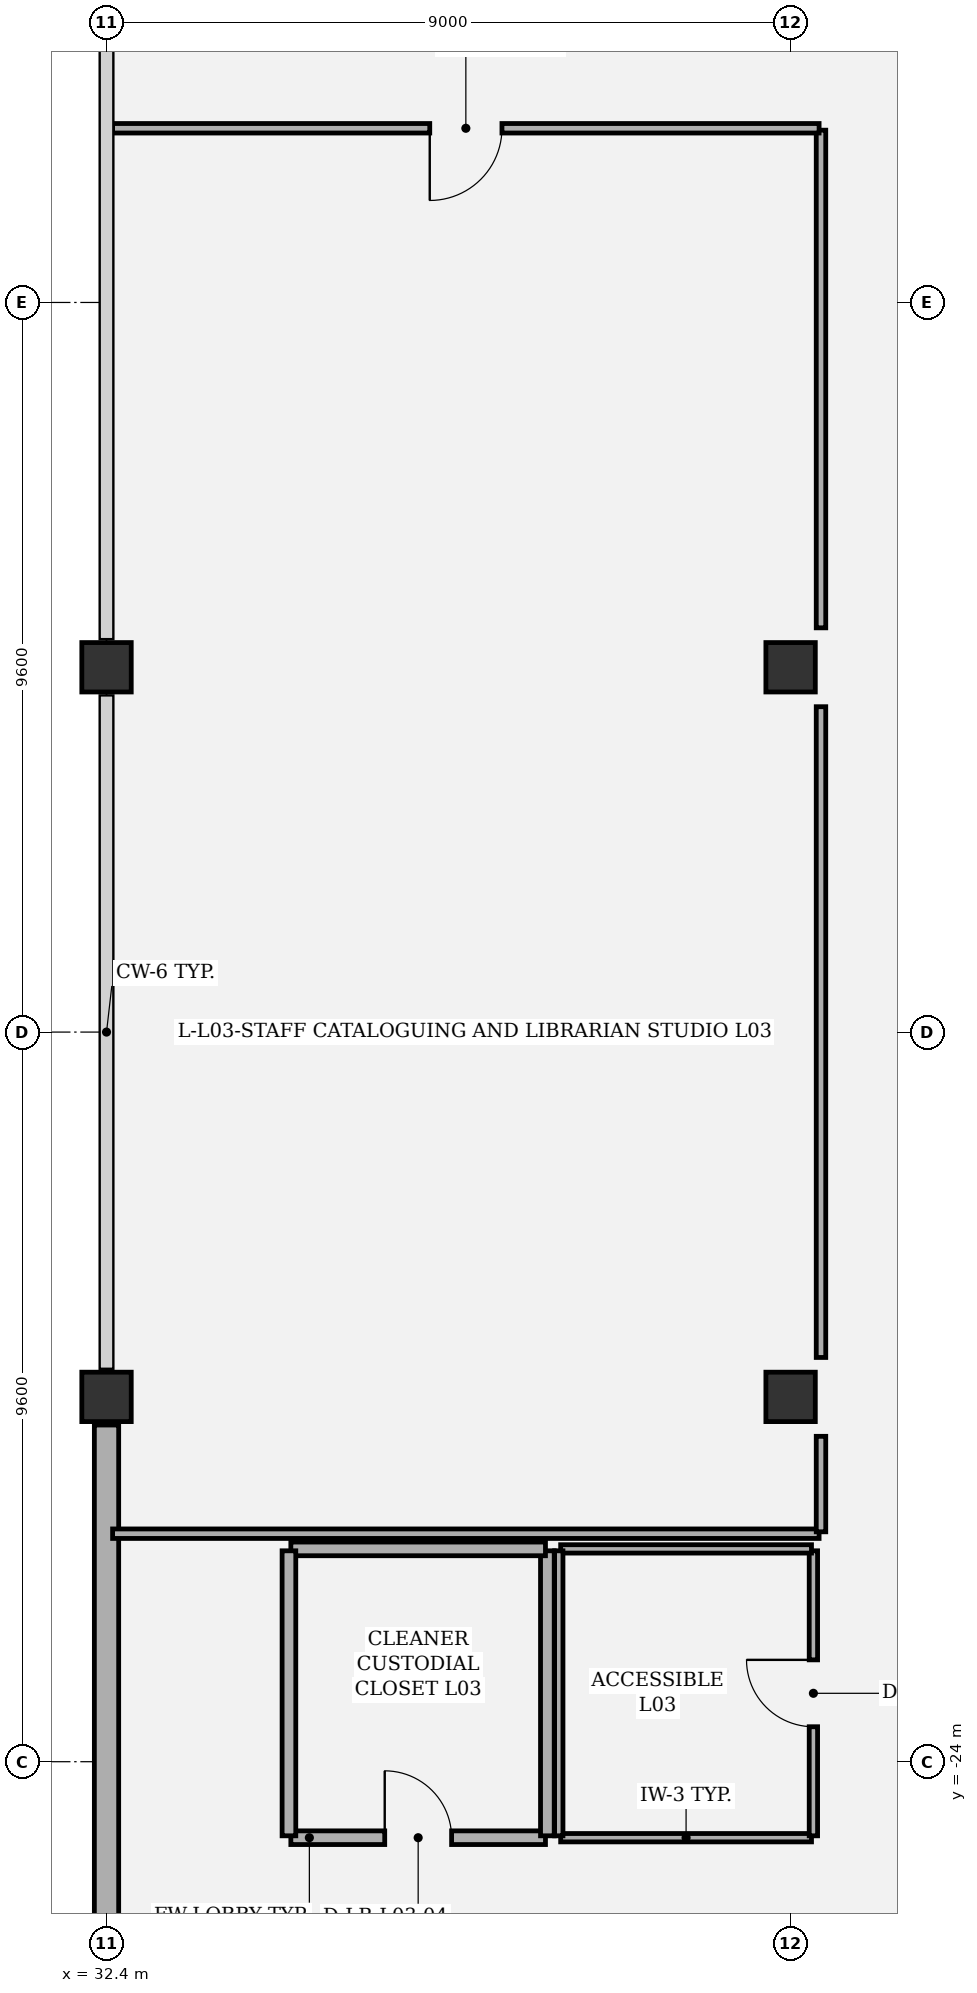
"""IFC4 building model, lengths in metres.
Left out: names, types, materials, properties, quantities, classifications, styles, units other than length and angle.
Written with IfcOpenShell. Run it as: python <this file> out.ifc"""

import sys

from ifc_helpers import new_model, si_unit, direction, frame, frame_2d, origin, origin_2d, place, context, subcontext, project, spatial, rectangle, extrude, element, fill, save


model = new_model("IFC4")
c1 = context("Model", 3, precision=1e-05, world=origin(), true_north=direction((0.0, 1.0)))
c2 = subcontext(c1, "Body", "Model", "MODEL_VIEW")
j1 = project(units=[si_unit("LENGTHUNIT", "METRE"), si_unit("PLANEANGLEUNIT", "RADIAN")], contexts=[c1])
p1 = place(None, origin())
s1 = spatial("IfcSite", under=j1, at=p1, CompositionType="ELEMENT")
p2 = place(p1, origin())
s2 = spatial("IfcBuilding", under=s1, at=p2, CompositionType="ELEMENT")
p3 = place(p2, frame((0.0, 0.0, 17.0)))
s3 = spatial("IfcBuildingStorey", under=s2, at=p3, CompositionType="ELEMENT", Elevation=17.0)
for number, where, z_axis, x_axis in (
    (1, (32.4, -19.2, 0.0), (0.0, 0.0, 1.0), (1.0, 0.0, 0.0)),
    (2, (32.4, -9.6, 0.0), (0.0, 0.0, 1.0), (1.0, 0.0, 0.0)),
    (3, (41.4, -19.2, 0.0), (0.0, 0.0, 1.0), (1.0, 0.0, 0.0)),
    (4, (41.4, -9.6, 0.0), (0.0, 0.0, 1.0), (1.0, 0.0, 0.0)),
):
    element("IfcColumn", number, at=place(p3, frame(where, z_axis=z_axis, x_axis=x_axis)), inside=s3, PredefinedType="COLUMN", context=c2, shape_type="SweptSolid", body=[
        extrude(rectangle(XDim=0.65, YDim=0.65, at=origin_2d()), origin(), (0.0, 0.0, 1.0), 5.0),
    ])
p4 = place(p3, frame((32.4, -28.43, 0.0), z_axis=(0.0, 0.0, 1.0), x_axis=(0.0, 1.0, 0.0)))
e5 = element("IfcWall", 5, at=p4, inside=s3, PredefinedType="SOLIDWALL", context=c2, shape_type="SweptSolid", body=[
    extrude(rectangle(XDim=8.86, YDim=0.32, at=frame_2d((4.43, 0.0))), origin(), (0.0, 0.0, 1.0), 3.937),
])
p5 = place(p3, frame((38.375, -25.0, 0.0), z_axis=(0.0, 0.0, 1.0), x_axis=(1.0, 0.0, 0.0)))
e6 = element("IfcWall", 6, at=p5, inside=s3, PredefinedType="PARTITIONING", context=c2, shape_type="SweptSolid", body=[
    extrude(rectangle(XDim=3.3, YDim=0.11, at=frame_2d((1.65, 0.0))), origin(), (0.0, 0.0, 1.0), 4.74),
])
p6 = place(p3, frame((41.7, -24.975, 0.0), z_axis=(0.0, 0.0, 1.0), x_axis=(0.0, 1.0, 0.0)))
e7 = element("IfcWall", 7, at=p6, inside=s3, PredefinedType="PARTITIONING", context=c2, shape_type="SweptSolid", body=[
    extrude(rectangle(XDim=3.75, YDim=0.11, at=frame_2d((1.875, 0.0))), origin(), (0.0, 0.0, 1.0), 4.094),
])
p7 = place(p6, frame((1.435, 0.0, 0.0)))
e8 = element("IfcOpeningElement", 8, at=p7, cuts=e7, PredefinedType="OPENING", context=c2, shape_type="SweptSolid", body=[
    extrude(rectangle(XDim=0.88, YDim=2.1, at=frame_2d((0.44, 1.05))), frame((0.0, 0.065, 0.0), z_axis=(0.0, -1.0, 0.0), x_axis=(1.0, 0.0, 0.0)), (0.0, 0.0, 1.0), 0.13),
])
p8 = place(p3, frame((41.675, -21.2, 0.0), z_axis=(0.0, 0.0, 1.0), x_axis=(-1.0, 0.0, 0.0)))
e9 = element("IfcWall", 9, at=p8, inside=s3, PredefinedType="PARTITIONING", context=c2, shape_type="SweptSolid", body=[
    extrude(rectangle(XDim=3.3, YDim=0.11, at=frame_2d((1.65, 0.0))), origin(), (0.0, 0.0, 1.0), 4.74),
])
p9 = place(p3, frame((38.35, -21.225, 0.0), z_axis=(0.0, 0.0, 1.0), x_axis=(0.0, -1.0, 0.0)))
e10 = element("IfcWall", 10, at=p9, inside=s3, PredefinedType="PARTITIONING", context=c2, shape_type="SweptSolid", body=[
    extrude(rectangle(XDim=3.75, YDim=0.11, at=frame_2d((1.875, 0.0))), origin(), (0.0, 0.0, 1.0), 4.74),
])
p10 = place(p3, frame((34.825, -25.0, 0.0), z_axis=(0.0, 0.0, 1.0), x_axis=(1.0, 0.0, 0.0)))
e11 = element("IfcWall", 11, at=p10, inside=s3, PredefinedType="PARTITIONING", context=c2, shape_type="SweptSolid", body=[
    extrude(rectangle(XDim=3.35, YDim=0.18, at=frame_2d((1.675, 0.0))), origin(), (0.0, 0.0, 1.0), 4.74),
])
p11 = place(p10, frame((1.235, 0.0, 0.0)))
e12 = element("IfcOpeningElement", 12, at=p11, cuts=e11, PredefinedType="OPENING", context=c2, shape_type="SweptSolid", body=[
    extrude(rectangle(XDim=0.88, YDim=2.1, at=frame_2d((0.44, 1.05))), frame((0.0, 0.1, 0.0), z_axis=(0.0, -1.0, 0.0), x_axis=(1.0, 0.0, 0.0)), (0.0, 0.0, 1.0), 0.2),
])
p12 = place(p3, frame((38.2, -24.975, 0.0), z_axis=(0.0, 0.0, 1.0), x_axis=(0.0, 1.0, 0.0)))
e13 = element("IfcWall", 13, at=p12, inside=s3, PredefinedType="PARTITIONING", context=c2, shape_type="SweptSolid", body=[
    extrude(rectangle(XDim=3.75, YDim=0.18, at=frame_2d((1.875, 0.0))), origin(), (0.0, 0.0, 1.0), 4.74),
])
p13 = place(p3, frame((38.175, -21.2, 0.0), z_axis=(0.0, 0.0, 1.0), x_axis=(-1.0, 0.0, 0.0)))
e14 = element("IfcWall", 14, at=p13, inside=s3, PredefinedType="PARTITIONING", context=c2, shape_type="SweptSolid", body=[
    extrude(rectangle(XDim=3.35, YDim=0.18, at=frame_2d((1.675, 0.0))), origin(), (0.0, 0.0, 1.0), 4.74),
])
p14 = place(p3, frame((34.8, -21.225, 0.0), z_axis=(0.0, 0.0, 1.0), x_axis=(0.0, -1.0, 0.0)))
e15 = element("IfcWall", 15, at=p14, inside=s3, PredefinedType="PARTITIONING", context=c2, shape_type="SweptSolid", body=[
    extrude(rectangle(XDim=3.75, YDim=0.18, at=frame_2d((1.875, 0.0))), origin(), (0.0, 0.0, 1.0), 4.74),
])
p15 = place(p3, frame((32.48, -21.0, 0.0), z_axis=(0.0, 0.0, 1.0), x_axis=(1.0, 0.0, 0.0)))
e16 = element("IfcWall", 16, at=p15, inside=s3, PredefinedType="PARTITIONING", context=c2, shape_type="SweptSolid", body=[
    extrude(rectangle(XDim=9.295, YDim=0.125, at=frame_2d((4.647, 0.0))), origin(), (0.0, 0.0, 1.0), 4.74),
])
p16 = place(p3, frame((41.8, -20.975, 0.0), z_axis=(0.0, 0.0, 1.0), x_axis=(0.0, 1.0, 0.0)))
e17 = element("IfcWall", 17, at=p16, inside=s3, PredefinedType="PARTITIONING", context=c2, shape_type="SweptSolid", body=[
    extrude(rectangle(XDim=1.256, YDim=0.125, at=frame_2d((0.628, 0.0))), origin(), (0.0, 0.0, 1.0), 4.74),
])
p17 = place(p3, frame((41.8, -18.681, 0.0), z_axis=(0.0, 0.0, 1.0), x_axis=(0.0, 1.0, 0.0)))
e18 = element("IfcWall", 18, at=p17, inside=s3, PredefinedType="PARTITIONING", context=c2, shape_type="SweptSolid", body=[
    extrude(rectangle(XDim=8.562, YDim=0.125, at=frame_2d((4.281, 0.0))), origin(), (0.0, 0.0, 1.0), 4.74),
])
p18 = place(p3, frame((41.8, -9.081, 0.0), z_axis=(0.0, 0.0, 1.0), x_axis=(0.0, 1.0, 0.0)))
e19 = element("IfcWall", 19, at=p18, inside=s3, PredefinedType="PARTITIONING", context=c2, shape_type="SweptSolid", body=[
    extrude(rectangle(XDim=6.548, YDim=0.125, at=frame_2d((3.274, 0.0))), origin(), (0.0, 0.0, 1.0), 4.74),
])
p19 = place(p3, frame((41.775, -2.508, 0.0), z_axis=(0.0, 0.0, 1.0), x_axis=(-1.0, 0.0, 0.0)))
e20 = element("IfcWall", 20, at=p19, inside=s3, PredefinedType="PARTITIONING", context=c2, shape_type="SweptSolid", body=[
    extrude(rectangle(XDim=9.295, YDim=0.125, at=frame_2d((4.647, 0.0))), origin(), (0.0, 0.0, 1.0), 4.253),
])
p20 = place(p19, frame((4.172, 0.0, 0.0)))
e21 = element("IfcOpeningElement", 21, at=p20, cuts=e20, PredefinedType="OPENING", context=c2, shape_type="SweptSolid", body=[
    extrude(rectangle(XDim=0.95, YDim=2.15, at=frame_2d((0.475, 1.075))), frame((0.0, 0.073, 0.0), z_axis=(0.0, -1.0, 0.0), x_axis=(1.0, 0.0, 0.0)), (0.0, 0.0, 1.0), 0.145),
])
p21 = place(p7, origin())
e22 = element("IfcDoor", 22, at=p21, inside=s3, OperationType="SINGLE_SWING_RIGHT", PredefinedType="DOOR", context=c2, shape_type="SweptSolid", body=[
    extrude(rectangle(XDim=0.88, YDim=2.1, at=frame_2d((0.44, 1.05))), frame((0.0, 0.025, 0.0), z_axis=(0.0, -1.0, 0.0), x_axis=(1.0, 0.0, 0.0)), (0.0, 0.0, 1.0), 0.05),
])
fill(e8, e22)
p22 = place(p11, origin())
e23 = element("IfcDoor", 23, at=p22, inside=s3, OperationType="SINGLE_SWING_LEFT", PredefinedType="DOOR", context=c2, shape_type="SweptSolid", body=[
    extrude(rectangle(XDim=0.88, YDim=2.1, at=frame_2d((0.44, 1.05))), frame((0.0, 0.025, 0.0), z_axis=(0.0, -1.0, 0.0), x_axis=(1.0, 0.0, 0.0)), (0.0, 0.0, 1.0), 0.05),
])
fill(e12, e23)
p23 = place(p20, origin())
e24 = element("IfcDoor", 24, at=p23, inside=s3, OperationType="SINGLE_SWING_RIGHT", PredefinedType="DOOR", context=c2, shape_type="SweptSolid", body=[
    extrude(rectangle(XDim=0.95, YDim=2.15, at=frame_2d((0.475, 1.075))), frame((0.0, 0.025, 0.0), z_axis=(0.0, -1.0, 0.0), x_axis=(1.0, 0.0, 0.0)), (0.0, 0.0, 1.0), 0.05),
])
fill(e21, e24)
save(model, sys.argv[1])
